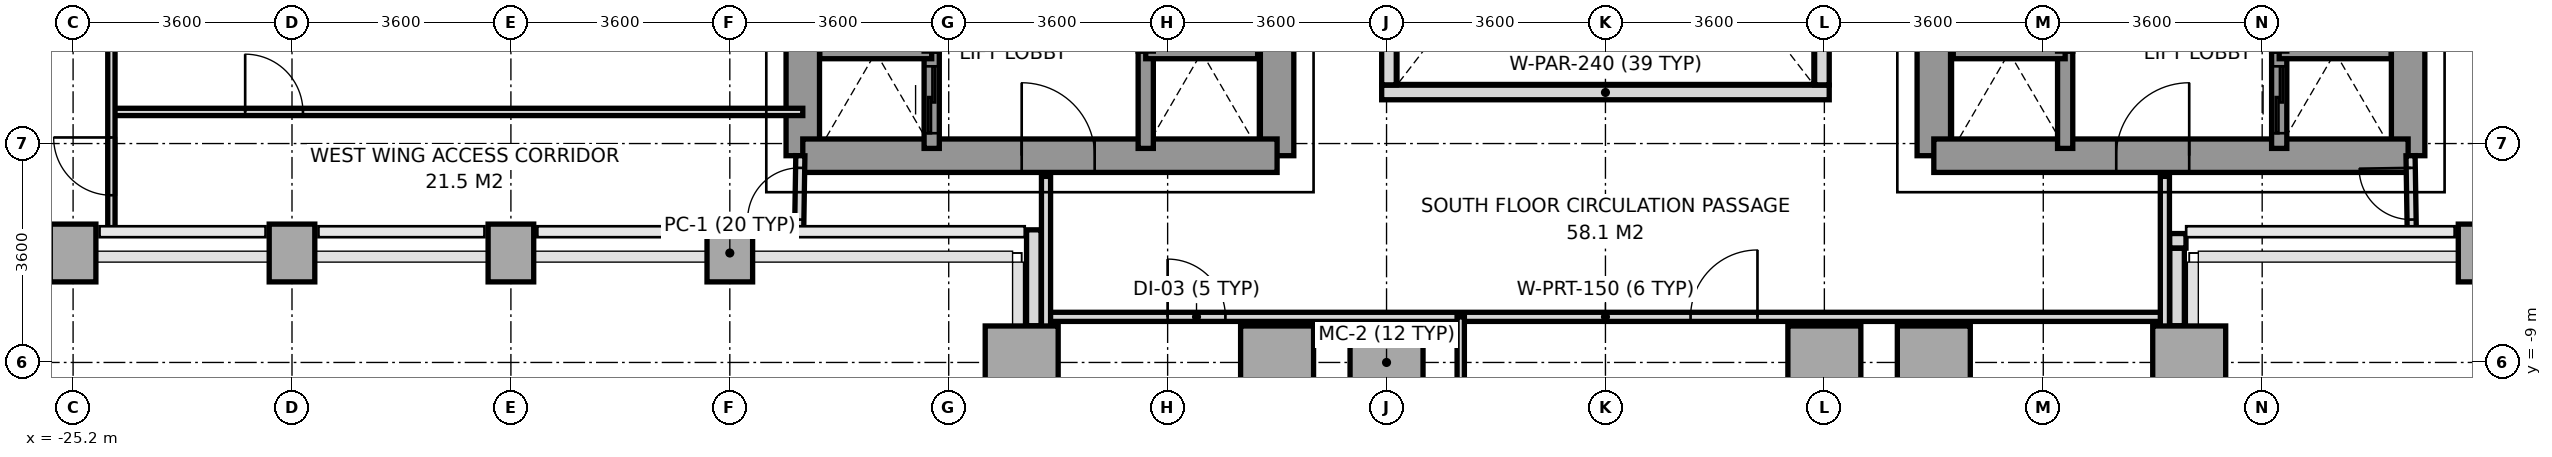
"""IFC4 building model, lengths in metres.
Left out: names, types, materials, properties, quantities, classifications, styles, units other than length and angle.
Written with IfcOpenShell. Run it as: python <this file> out.ifc"""

import sys

from ifc_helpers import new_model, si_unit, direction, frame, frame_2d, origin, origin_2d, place, context, subcontext, project, spatial, rectangle, extrude, source, transform, mapped, element, fill, save


model = new_model("IFC4")
c1 = context("Model", 3, precision=1e-05, world=origin(), true_north=direction((0.0, 1.0)))
c2 = subcontext(c1, "Body", "Model", "MODEL_VIEW")
j1 = project(units=[si_unit("LENGTHUNIT", "METRE"), si_unit("PLANEANGLEUNIT", "RADIAN")], contexts=[c1])
p1 = place(None, origin())
s1 = spatial("IfcSite", under=j1, at=p1, CompositionType="ELEMENT")
p2 = place(p1, origin())
s2 = spatial("IfcBuilding", under=s1, at=p2, CompositionType="ELEMENT")
p3 = place(p2, frame((0.0, 0.0, 30.6)))
s3 = spatial("IfcBuildingStorey", under=s2, at=p3, CompositionType="ELEMENT", Elevation=30.6)
m1 = source(origin(), c2, "Body", "SweptSolid", [
    extrude(rectangle(XDim=0.75, YDim=0.95, at=origin_2d()), origin(), (0.0, 0.0, 1.0), 3.2),
])
for number, where, z_axis, x_axis in (
    (1, (-25.2, -7.2, 0.0), (0.0, 0.0, 1.0), (1.0, 0.0, 0.0)),
    (2, (-21.6, -7.2, 0.0), (0.0, 0.0, 1.0), (1.0, 0.0, 0.0)),
    (3, (-18.0, -7.2, 0.0), (0.0, 0.0, 1.0), (1.0, 0.0, 0.0)),
    (4, (-14.4, -7.2, 0.0), (0.0, 0.0, 1.0), (1.0, 0.0, 0.0)),
):
    element("IfcColumn", number, at=place(p3, frame(where, z_axis=z_axis, x_axis=x_axis)), inside=s3, PredefinedType="COLUMN", context=c2, shape_type="MappedRepresentation", body=[
        mapped(m1, transform((0.0, 0.0, 0.0), x_axis=(1.0, 0.0, 0.0), y_axis=(0.0, 1.0, 0.0), z_axis=(0.0, 0.0, 1.0), scale=1.0)),
    ])
m2 = source(origin(), c2, "Body", "SweptSolid", [
    extrude(rectangle(XDim=1.2, YDim=1.2, at=origin_2d()), origin(), (0.0, 0.0, 1.0), 3.2),
])
for number, where, z_axis, x_axis in (
    (5, (-9.6, -9.0, 0.0), (0.0, 0.0, 1.0), (1.0, 0.0, 0.0)),
    (6, (-5.4, -9.0, 0.0), (0.0, 0.0, 1.0), (1.0, 0.0, 0.0)),
    (7, (-3.6, -9.0, 0.0), (0.0, 0.0, 1.0), (1.0, 0.0, 0.0)),
    (8, (3.6, -9.0, 0.0), (0.0, 0.0, 1.0), (1.0, 0.0, 0.0)),
    (9, (5.4, -9.0, 0.0), (0.0, 0.0, 1.0), (1.0, 0.0, 0.0)),
    (10, (9.6, -9.0, 0.0), (0.0, 0.0, 1.0), (1.0, 0.0, 0.0)),
):
    element("IfcColumn", number, at=place(p3, frame(where, z_axis=z_axis, x_axis=x_axis)), inside=s3, PredefinedType="COLUMN", context=c2, shape_type="MappedRepresentation", body=[
        mapped(m2, transform((0.0, 0.0, 0.0), x_axis=(1.0, 0.0, 0.0), y_axis=(0.0, 1.0, 0.0), z_axis=(0.0, 0.0, 1.0), scale=1.0)),
    ])
p4 = place(p3, frame((14.4, -7.2, 0.0), z_axis=(0.0, 0.0, 1.0), x_axis=(1.0, 0.0, 0.0)))
e11 = element("IfcColumn", 11, at=p4, inside=s3, PredefinedType="COLUMN", context=c2, shape_type="MappedRepresentation", body=[
    mapped(m1, transform((0.0, 0.0, 0.0), x_axis=(1.0, 0.0, 0.0), y_axis=(0.0, 1.0, 0.0), z_axis=(0.0, 0.0, 1.0), scale=1.0)),
])
p5 = place(p3, frame((9.547, -7.0, 0.0), z_axis=(0.0, 0.0, 1.0), x_axis=(-1.0, 0.0, 0.0)))
e12 = element("IfcWall", 12, at=p5, inside=s3, PredefinedType="PARAPET", context=c2, shape_type="SweptSolid", body=[
    extrude(rectangle(XDim=0.269, YDim=0.24, at=frame_2d((0.135, 0.0))), origin(), (0.0, 0.0, 1.0), 1.15),
])
p6 = place(p3, frame((9.4, -7.123, 0.0), z_axis=(0.0, 0.0, 1.0), x_axis=(0.0, -1.0, 0.0)))
e13 = element("IfcWall", 13, at=p6, inside=s3, PredefinedType="PARAPET", context=c2, shape_type="SweptSolid", body=[
    extrude(rectangle(XDim=1.274, YDim=0.24, at=frame_2d((0.637, 0.0))), origin(), (0.0, 0.0, 1.0), 1.15),
])
p7 = place(p3, frame((-9.4, -8.397, 0.0), z_axis=(0.0, 0.0, 1.0), x_axis=(0.0, 1.0, 0.0)))
e14 = element("IfcWall", 14, at=p7, inside=s3, PredefinedType="PARAPET", context=c2, shape_type="SweptSolid", body=[
    extrude(rectangle(XDim=1.578, YDim=0.24, at=frame_2d((0.789, 0.0))), origin(), (0.0, 0.0, 1.0), 1.15),
])
p8 = place(p3, frame((-13.2, -5.6, 0.0), z_axis=(0.0, 0.0, 1.0), x_axis=(0.0, 1.0, 0.0)))
e15 = element("IfcWall", 15, at=p8, inside=s3, PredefinedType="SHEAR", context=c2, shape_type="SweptSolid", body=[
    extrude(rectangle(XDim=11.2, YDim=0.55, at=frame_2d((5.6, 0.0))), origin(), (0.0, 0.0, 1.0), 3.2),
])
p9 = place(p3, frame((-5.4, -5.6, 0.0), z_axis=(0.0, 0.0, 1.0), x_axis=(0.0, 1.0, 0.0)))
e16 = element("IfcWall", 16, at=p9, inside=s3, PredefinedType="SHEAR", context=c2, shape_type="SweptSolid", body=[
    extrude(rectangle(XDim=12.5, YDim=0.55, at=frame_2d((6.25, 0.0))), origin(), (0.0, 0.0, 1.0), 3.2),
])
p10 = place(p9, frame((4.55, 0.0, 0.0)))
e17 = element("IfcOpeningElement", 17, at=p10, cuts=e16, PredefinedType="OPENING", context=c2, shape_type="SweptSolid", body=[
    extrude(rectangle(XDim=1.2, YDim=2.2, at=frame_2d((0.6, 1.1))), frame((0.0, 0.285, 0.0), z_axis=(0.0, -1.0, 0.0), x_axis=(1.0, 0.0, 0.0)), (0.0, 0.0, 1.0), 0.57),
])
p11 = place(p9, frame((6.86, 0.0, 0.0)))
e18 = element("IfcOpeningElement", 18, at=p11, cuts=e16, PredefinedType="OPENING", context=c2, shape_type="SweptSolid", body=[
    extrude(rectangle(XDim=0.8, YDim=2.1, at=frame_2d((0.4, 1.05))), frame((0.0, 0.285, 0.0), z_axis=(0.0, -1.0, 0.0), x_axis=(1.0, 0.0, 0.0)), (0.0, 0.0, 1.0), 0.57),
])
p12 = place(p3, frame((-13.2, -5.6, 0.0), z_axis=(0.0, 0.0, 1.0), x_axis=(1.0, 0.0, 0.0)))
e19 = element("IfcWall", 19, at=p12, inside=s3, PredefinedType="SHEAR", context=c2, shape_type="SweptSolid", body=[
    extrude(rectangle(XDim=7.8, YDim=0.55, at=frame_2d((3.9, 0.0))), origin(), (0.0, 0.0, 1.0), 3.2),
])
p13 = place(p12, frame((3.6, 0.0, 0.0)))
e20 = element("IfcOpeningElement", 20, at=p13, cuts=e19, PredefinedType="OPENING", context=c2, shape_type="SweptSolid", body=[
    extrude(rectangle(XDim=1.2, YDim=2.2, at=frame_2d((0.6, 1.1))), frame((0.0, 0.285, 0.0), z_axis=(0.0, -1.0, 0.0), x_axis=(1.0, 0.0, 0.0)), (0.0, 0.0, 1.0), 0.57),
])
p14 = place(p3, frame((13.2, -5.6, 0.0), z_axis=(0.0, 0.0, 1.0), x_axis=(0.0, 1.0, 0.0)))
e21 = element("IfcWall", 21, at=p14, inside=s3, PredefinedType="SHEAR", context=c2, shape_type="SweptSolid", body=[
    extrude(rectangle(XDim=11.2, YDim=0.55, at=frame_2d((5.6, 0.0))), origin(), (0.0, 0.0, 1.0), 3.2),
])
p15 = place(p3, frame((5.4, -5.6, 0.0), z_axis=(0.0, 0.0, 1.0), x_axis=(0.0, 1.0, 0.0)))
e22 = element("IfcWall", 22, at=p15, inside=s3, PredefinedType="SHEAR", context=c2, shape_type="SweptSolid", body=[
    extrude(rectangle(XDim=12.5, YDim=0.55, at=frame_2d((6.25, 0.0))), origin(), (0.0, 0.0, 1.0), 3.2),
])
p16 = place(p15, frame((4.55, 0.0, 0.0)))
e23 = element("IfcOpeningElement", 23, at=p16, cuts=e22, PredefinedType="OPENING", context=c2, shape_type="SweptSolid", body=[
    extrude(rectangle(XDim=1.2, YDim=2.2, at=frame_2d((0.6, 1.1))), frame((0.0, 0.285, 0.0), z_axis=(0.0, -1.0, 0.0), x_axis=(1.0, 0.0, 0.0)), (0.0, 0.0, 1.0), 0.57),
])
p17 = place(p15, frame((6.86, 0.0, 0.0)))
e24 = element("IfcOpeningElement", 24, at=p17, cuts=e22, PredefinedType="OPENING", context=c2, shape_type="SweptSolid", body=[
    extrude(rectangle(XDim=0.8, YDim=2.1, at=frame_2d((0.4, 1.05))), frame((0.0, 0.285, 0.0), z_axis=(0.0, -1.0, 0.0), x_axis=(1.0, 0.0, 0.0)), (0.0, 0.0, 1.0), 0.57),
])
p18 = place(p3, frame((5.4, -5.6, 0.0), z_axis=(0.0, 0.0, 1.0), x_axis=(1.0, 0.0, 0.0)))
e25 = element("IfcWall", 25, at=p18, inside=s3, PredefinedType="SHEAR", context=c2, shape_type="SweptSolid", body=[
    extrude(rectangle(XDim=7.8, YDim=0.55, at=frame_2d((3.9, 0.0))), origin(), (0.0, 0.0, 1.0), 3.2),
])
p19 = place(p18, frame((3.0, 0.0, 0.0)))
e26 = element("IfcOpeningElement", 26, at=p19, cuts=e25, PredefinedType="OPENING", context=c2, shape_type="SweptSolid", body=[
    extrude(rectangle(XDim=1.2, YDim=2.2, at=frame_2d((0.6, 1.1))), frame((0.0, 0.285, 0.0), z_axis=(0.0, -1.0, 0.0), x_axis=(1.0, 0.0, 0.0)), (0.0, 0.0, 1.0), 0.57),
])
p20 = place(p3, frame((-11.08, -5.48, 0.0), z_axis=(0.0, 0.0, 1.0), x_axis=(0.0, 1.0, 0.0)))
e27 = element("IfcWall", 27, at=p20, inside=s3, PredefinedType="SOLIDWALL", context=c2, shape_type="SweptSolid", body=[
    extrude(rectangle(XDim=1.6, YDim=0.25, at=frame_2d((0.8, 0.0))), origin(), (0.0, 0.0, 1.0), 3.2),
])
p21 = place(p20, frame((0.25, 0.0, 0.0)))
e28 = element("IfcOpeningElement", 28, at=p21, cuts=e27, PredefinedType="OPENING", context=c2, shape_type="SweptSolid", body=[
    extrude(rectangle(XDim=1.1, YDim=2.2, at=frame_2d((0.55, 1.1))), frame((0.0, 0.135, 0.0), z_axis=(0.0, -1.0, 0.0), x_axis=(1.0, 0.0, 0.0)), (0.0, 0.0, 1.0), 0.27),
])
p22 = place(p3, frame((-12.92, -3.88, 0.0), z_axis=(0.0, 0.0, 1.0), x_axis=(1.0, 0.0, 0.0)))
e29 = element("IfcWall", 29, at=p22, inside=s3, PredefinedType="SOLIDWALL", context=c2, shape_type="SweptSolid", body=[
    extrude(rectangle(XDim=1.84, YDim=0.25, at=frame_2d((0.92, 0.0))), origin(), (0.0, 0.0, 1.0), 3.2),
])
p23 = place(p3, frame((11.08, -5.48, 0.0), z_axis=(0.0, 0.0, 1.0), x_axis=(0.0, 1.0, 0.0)))
e30 = element("IfcWall", 30, at=p23, inside=s3, PredefinedType="SOLIDWALL", context=c2, shape_type="SweptSolid", body=[
    extrude(rectangle(XDim=1.6, YDim=0.25, at=frame_2d((0.8, 0.0))), origin(), (0.0, 0.0, 1.0), 3.2),
])
p24 = place(p23, frame((0.25, 0.0, 0.0)))
e31 = element("IfcOpeningElement", 31, at=p24, cuts=e30, PredefinedType="OPENING", context=c2, shape_type="SweptSolid", body=[
    extrude(rectangle(XDim=1.1, YDim=2.2, at=frame_2d((0.55, 1.1))), frame((0.0, 0.135, 0.0), z_axis=(0.0, -1.0, 0.0), x_axis=(1.0, 0.0, 0.0)), (0.0, 0.0, 1.0), 0.27),
])
p25 = place(p3, frame((11.08, -3.88, 0.0), z_axis=(0.0, 0.0, 1.0), x_axis=(1.0, 0.0, 0.0)))
e32 = element("IfcWall", 32, at=p25, inside=s3, PredefinedType="SOLIDWALL", context=c2, shape_type="SweptSolid", body=[
    extrude(rectangle(XDim=1.84, YDim=0.25, at=frame_2d((0.92, 0.0))), origin(), (0.0, 0.0, 1.0), 3.2),
])
p26 = place(p3, frame((-7.56, -5.48, 0.0), z_axis=(0.0, 0.0, 1.0), x_axis=(0.0, 1.0, 0.0)))
e33 = element("IfcWall", 33, at=p26, inside=s3, PredefinedType="SOLIDWALL", context=c2, shape_type="SweptSolid", body=[
    extrude(rectangle(XDim=1.6, YDim=0.25, at=frame_2d((0.8, 0.0))), origin(), (0.0, 0.0, 1.0), 3.2),
])
p27 = place(p3, frame((-7.56, -3.88, 0.0), z_axis=(0.0, 0.0, 1.0), x_axis=(1.0, 0.0, 0.0)))
e34 = element("IfcWall", 34, at=p27, inside=s3, PredefinedType="SOLIDWALL", context=c2, shape_type="SweptSolid", body=[
    extrude(rectangle(XDim=1.84, YDim=0.25, at=frame_2d((0.92, 0.0))), origin(), (0.0, 0.0, 1.0), 3.2),
])
p28 = place(p3, frame((7.56, -5.48, 0.0), z_axis=(0.0, 0.0, 1.0), x_axis=(0.0, 1.0, 0.0)))
e35 = element("IfcWall", 35, at=p28, inside=s3, PredefinedType="SOLIDWALL", context=c2, shape_type="SweptSolid", body=[
    extrude(rectangle(XDim=1.6, YDim=0.25, at=frame_2d((0.8, 0.0))), origin(), (0.0, 0.0, 1.0), 3.2),
])
p29 = place(p3, frame((5.72, -3.88, 0.0), z_axis=(0.0, 0.0, 1.0), x_axis=(1.0, 0.0, 0.0)))
e36 = element("IfcWall", 36, at=p29, inside=s3, PredefinedType="SOLIDWALL", context=c2, shape_type="SweptSolid", body=[
    extrude(rectangle(XDim=1.84, YDim=0.25, at=frame_2d((0.92, 0.0))), origin(), (0.0, 0.0, 1.0), 3.2),
])
p30 = place(p3, frame((-9.2, -8.25, 0.0), z_axis=(0.0, 0.0, 1.0), x_axis=(1.0, 0.0, 0.0)))
e37 = element("IfcWall", 37, at=p30, inside=s3, PredefinedType="PARTITIONING", context=c2, shape_type="SweptSolid", body=[
    extrude(rectangle(XDim=18.4, YDim=0.15, at=frame_2d((9.2, 0.0))), origin(), (0.0, 0.0, 1.0), 2.7),
])
p31 = place(p30, frame((2.0, 0.0, 0.0)))
e38 = element("IfcOpeningElement", 38, at=p31, cuts=e37, PredefinedType="OPENING", context=c2, shape_type="SweptSolid", body=[
    extrude(rectangle(XDim=0.95, YDim=2.15, at=frame_2d((0.475, 1.075))), frame((0.0, 0.085, 0.0), z_axis=(0.0, -1.0, 0.0), x_axis=(1.0, 0.0, 0.0)), (0.0, 0.0, 1.0), 0.17),
])
p32 = place(p30, frame((10.6, 0.0, 0.0)))
e39 = element("IfcOpeningElement", 39, at=p32, cuts=e37, PredefinedType="OPENING", context=c2, shape_type="SweptSolid", body=[
    extrude(rectangle(XDim=1.1, YDim=2.2, at=frame_2d((0.55, 1.1))), frame((0.0, 0.085, 0.0), z_axis=(0.0, -1.0, 0.0), x_axis=(1.0, 0.0, 0.0)), (0.0, 0.0, 1.0), 0.17),
])
for number, where, z_axis, x_axis in (
    (40, (-9.2, -15.68, 0.0), (0.0, 0.0, 1.0), (0.0, 1.0, 0.0)),
    (41, (9.2, -15.68, 0.0), (0.0, 0.0, 1.0), (0.0, 1.0, 0.0)),
):
    element("IfcWall", number, at=place(p3, frame(where, z_axis=z_axis, x_axis=x_axis)), inside=s3, PredefinedType="PARTITIONING", context=c2, shape_type="SweptSolid", body=[
        extrude(rectangle(XDim=9.74, YDim=0.15, at=frame_2d((4.87, 0.0))), origin(), (0.0, 0.0, 1.0), 2.65),
    ])
p33 = place(p3, frame((-2.38, -24.65, 0.0), z_axis=(0.0, 0.0, 1.0), x_axis=(0.0, 1.0, 0.0)))
e42 = element("IfcWall", 42, at=p33, inside=s3, PredefinedType="PARTITIONING", context=c2, shape_type="SweptSolid", body=[
    extrude(rectangle(XDim=16.4, YDim=0.12, at=frame_2d((8.2, 0.0))), origin(), (0.0, 0.0, 1.0), 2.65),
])
p34 = place(p3, frame((-13.26, -6.85, 0.0), z_axis=(0.0, 0.0, 1.0), x_axis=(0.016013571389, 0.999871774545, 0.0)))
e43 = element("IfcWall", 43, at=p34, inside=s3, PredefinedType="PARTITIONING", context=c2, shape_type="SweptSolid", body=[
    extrude(rectangle(XDim=1.25, YDim=0.15, at=frame_2d((0.625, 0.0))), origin(), (0.0, 0.0, 1.0), 3.2),
])
p35 = place(p34, frame((0.2, 0.0, 0.0)))
e44 = element("IfcOpeningElement", 44, at=p35, cuts=e43, PredefinedType="OPENING", context=c2, shape_type="SweptSolid", body=[
    extrude(rectangle(XDim=0.85, YDim=2.1, at=frame_2d((0.425, 1.05))), frame((0.0, 0.085, 0.0), z_axis=(0.0, -1.0, 0.0), x_axis=(1.0, 0.0, 0.0)), (0.0, 0.0, 1.0), 0.17),
])
p36 = place(p3, frame((-24.57, -4.88, 0.0), z_axis=(0.0, 0.0, 1.0), x_axis=(1.0, 0.0, 0.0)))
e45 = element("IfcWall", 45, at=p36, inside=s3, PredefinedType="PARTITIONING", context=c2, shape_type="SweptSolid", body=[
    extrude(rectangle(XDim=11.37, YDim=0.12, at=frame_2d((5.685, 0.0))), origin(), (0.0, 0.0, 1.0), 2.7),
])
p37 = place(p36, frame((2.2, 0.0, 0.0)))
e46 = element("IfcOpeningElement", 46, at=p37, cuts=e45, PredefinedType="OPENING", context=c2, shape_type="SweptSolid", body=[
    extrude(rectangle(XDim=0.95, YDim=2.15, at=frame_2d((0.475, 1.075))), frame((0.0, 0.07, 0.0), z_axis=(0.0, -1.0, 0.0), x_axis=(1.0, 0.0, 0.0)), (0.0, 0.0, 1.0), 0.14),
])
p38 = place(p3, frame((-24.57, -6.85, 0.0), z_axis=(0.0, 0.0, 1.0), x_axis=(0.0, 1.0, 0.0)))
e47 = element("IfcWall", 47, at=p38, inside=s3, PredefinedType="PARTITIONING", context=c2, shape_type="SweptSolid", body=[
    extrude(rectangle(XDim=13.7, YDim=0.12, at=frame_2d((6.85, 0.0))), origin(), (0.0, 0.0, 1.0), 2.65),
])
p39 = place(p38, frame((0.6, 0.0, 0.0)))
e48 = element("IfcOpeningElement", 48, at=p39, cuts=e47, PredefinedType="OPENING", context=c2, shape_type="SweptSolid", body=[
    extrude(rectangle(XDim=0.95, YDim=2.15, at=frame_2d((0.475, 1.075))), frame((0.0, 0.07, 0.0), z_axis=(0.0, -1.0, 0.0), x_axis=(1.0, 0.0, 0.0)), (0.0, 0.0, 1.0), 0.14),
])
p40 = place(p3, frame((13.26, -6.85, 0.0), z_axis=(0.0, 0.0, 1.0), x_axis=(-0.016013571389, 0.999871774545, 0.0)))
e49 = element("IfcWall", 49, at=p40, inside=s3, PredefinedType="PARTITIONING", context=c2, shape_type="SweptSolid", body=[
    extrude(rectangle(XDim=1.25, YDim=0.15, at=frame_2d((0.625, 0.0))), origin(), (0.0, 0.0, 1.0), 3.2),
])
p41 = place(p40, frame((0.2, 0.0, 0.0)))
e50 = element("IfcOpeningElement", 50, at=p41, cuts=e49, PredefinedType="OPENING", context=c2, shape_type="SweptSolid", body=[
    extrude(rectangle(XDim=0.85, YDim=2.1, at=frame_2d((0.425, 1.05))), frame((0.0, 0.085, 0.0), z_axis=(0.0, -1.0, 0.0), x_axis=(1.0, 0.0, 0.0)), (0.0, 0.0, 1.0), 0.17),
])
p42 = place(p3, frame((-3.68, -4.56, 0.0), z_axis=(0.0, 0.0, 1.0), x_axis=(1.0, 0.0, 0.0)))
e51 = element("IfcWall", 51, at=p42, inside=s3, PredefinedType="PARAPET", context=c2, shape_type="SweptSolid", body=[
    extrude(rectangle(XDim=7.36, YDim=0.24, at=frame_2d((3.68, 0.0))), origin(), (0.0, 0.0, 1.0), 1.15),
])
for number, where, z_axis, x_axis in (
    (52, (-3.56, -4.435, 0.0), (0.0, 0.0, 1.0), (0.0, 1.0, 0.0)),
    (53, (3.56, -4.435, 0.0), (0.0, 0.0, 1.0), (0.0, 1.0, 0.0)),
):
    element("IfcWall", number, at=place(p3, frame(where, z_axis=z_axis, x_axis=x_axis)), inside=s3, PredefinedType="PARAPET", context=c2, shape_type="SweptSolid", body=[
        extrude(rectangle(XDim=8.87, YDim=0.24, at=frame_2d((4.435, 0.0))), origin(), (0.0, 0.0, 1.0), 1.15),
    ])
m3 = source(origin(), c2, "Body", "SweptSolid", [
    extrude(rectangle(XDim=1.2, YDim=2.2, at=frame_2d((0.6, 1.1))), frame((0.0, 0.025, 0.0), z_axis=(0.0, -1.0, 0.0), x_axis=(1.0, 0.0, 0.0)), (0.0, 0.0, 1.0), 0.05),
])
p43 = place(p13, origin())
e54 = element("IfcDoor", 54, at=p43, inside=s3, OperationType="SINGLE_SWING_LEFT", PredefinedType="DOOR", context=c2, shape_type="MappedRepresentation", body=[
    mapped(m3, transform((0.0, 0.0, 0.0), x_axis=(1.0, 0.0, 0.0), y_axis=(0.0, 1.0, 0.0), z_axis=(0.0, 0.0, 1.0), scale=1.0)),
])
fill(e20, e54)
p44 = place(p19, origin())
e55 = element("IfcDoor", 55, at=p44, inside=s3, OperationType="SINGLE_SWING_RIGHT", PredefinedType="DOOR", context=c2, shape_type="MappedRepresentation", body=[
    mapped(m3, transform((0.0, 0.0, 0.0), x_axis=(1.0, 0.0, 0.0), y_axis=(0.0, 1.0, 0.0), z_axis=(0.0, 0.0, 1.0), scale=1.0)),
])
fill(e26, e55)
m4 = source(origin(), c2, "Body", "SweptSolid", [
    extrude(rectangle(XDim=1.1, YDim=2.2, at=frame_2d((0.55, 1.1))), frame((0.0, 0.025, 0.0), z_axis=(0.0, -1.0, 0.0), x_axis=(1.0, 0.0, 0.0)), (0.0, 0.0, 1.0), 0.05),
])
p45 = place(p21, origin())
e56 = element("IfcDoor", 56, at=p45, inside=s3, OperationType="SLIDING_TO_LEFT", PredefinedType="DOOR", context=c2, shape_type="MappedRepresentation", body=[
    mapped(m4, transform((0.0, 0.0, 0.0), x_axis=(1.0, 0.0, 0.0), y_axis=(0.0, 1.0, 0.0), z_axis=(0.0, 0.0, 1.0), scale=1.0)),
])
fill(e28, e56)
p46 = place(p24, origin())
e57 = element("IfcDoor", 57, at=p46, inside=s3, OperationType="SLIDING_TO_LEFT", PredefinedType="DOOR", context=c2, shape_type="MappedRepresentation", body=[
    mapped(m4, transform((0.0, 0.0, 0.0), x_axis=(1.0, 0.0, 0.0), y_axis=(0.0, 1.0, 0.0), z_axis=(0.0, 0.0, 1.0), scale=1.0)),
])
fill(e31, e57)
m5 = source(origin(), c2, "Body", "SweptSolid", [
    extrude(rectangle(XDim=0.95, YDim=2.15, at=frame_2d((0.475, 1.075))), frame((0.0, 0.025, 0.0), z_axis=(0.0, -1.0, 0.0), x_axis=(1.0, 0.0, 0.0)), (0.0, 0.0, 1.0), 0.05),
])
p47 = place(p31, origin())
e58 = element("IfcDoor", 58, at=p47, inside=s3, OperationType="SINGLE_SWING_LEFT", PredefinedType="DOOR", context=c2, shape_type="MappedRepresentation", body=[
    mapped(m5, transform((0.0, 0.0, 0.0), x_axis=(1.0, 0.0, 0.0), y_axis=(0.0, 1.0, 0.0), z_axis=(0.0, 0.0, 1.0), scale=1.0)),
])
fill(e38, e58)
p48 = place(p32, origin())
e59 = element("IfcDoor", 59, at=p48, inside=s3, OperationType="SINGLE_SWING_RIGHT", PredefinedType="DOOR", context=c2, shape_type="MappedRepresentation", body=[
    mapped(m4, transform((0.0, 0.0, 0.0), x_axis=(1.0, 0.0, 0.0), y_axis=(0.0, 1.0, 0.0), z_axis=(0.0, 0.0, 1.0), scale=1.0)),
])
fill(e39, e59)
p49 = place(p37, origin())
e60 = element("IfcDoor", 60, at=p49, inside=s3, OperationType="SINGLE_SWING_LEFT", PredefinedType="DOOR", context=c2, shape_type="MappedRepresentation", body=[
    mapped(m5, transform((0.0, 0.0, 0.0), x_axis=(1.0, 0.0, 0.0), y_axis=(0.0, 1.0, 0.0), z_axis=(0.0, 0.0, 1.0), scale=1.0)),
])
fill(e46, e60)
p50 = place(p39, origin())
e61 = element("IfcDoor", 61, at=p50, inside=s3, OperationType="SINGLE_SWING_RIGHT", PredefinedType="DOOR", context=c2, shape_type="MappedRepresentation", body=[
    mapped(m5, transform((0.0, 0.0, 0.0), x_axis=(1.0, 0.0, 0.0), y_axis=(0.0, 1.0, 0.0), z_axis=(0.0, 0.0, 1.0), scale=1.0)),
])
fill(e48, e61)
m6 = source(origin(), c2, "Body", "SweptSolid", [
    extrude(rectangle(XDim=0.85, YDim=2.1, at=frame_2d((0.425, 1.05))), frame((0.0, 0.025, 0.0), z_axis=(0.0, -1.0, 0.0), x_axis=(1.0, 0.0, 0.0)), (0.0, 0.0, 1.0), 0.05),
])
p51 = place(p35, origin())
e62 = element("IfcDoor", 62, at=p51, inside=s3, OperationType="SINGLE_SWING_LEFT", PredefinedType="DOOR", context=c2, shape_type="MappedRepresentation", body=[
    mapped(m6, transform((0.0, 0.0, 0.0), x_axis=(1.0, 0.0, 0.0), y_axis=(0.0, 1.0, 0.0), z_axis=(0.0, 0.0, 1.0), scale=1.0)),
])
fill(e44, e62)
p52 = place(p41, origin())
e63 = element("IfcDoor", 63, at=p52, inside=s3, OperationType="SINGLE_SWING_RIGHT", PredefinedType="DOOR", context=c2, shape_type="MappedRepresentation", body=[
    mapped(m6, transform((0.0, 0.0, 0.0), x_axis=(1.0, 0.0, 0.0), y_axis=(0.0, 1.0, 0.0), z_axis=(0.0, 0.0, 1.0), scale=1.0)),
])
fill(e50, e63)
save(model, sys.argv[1])
